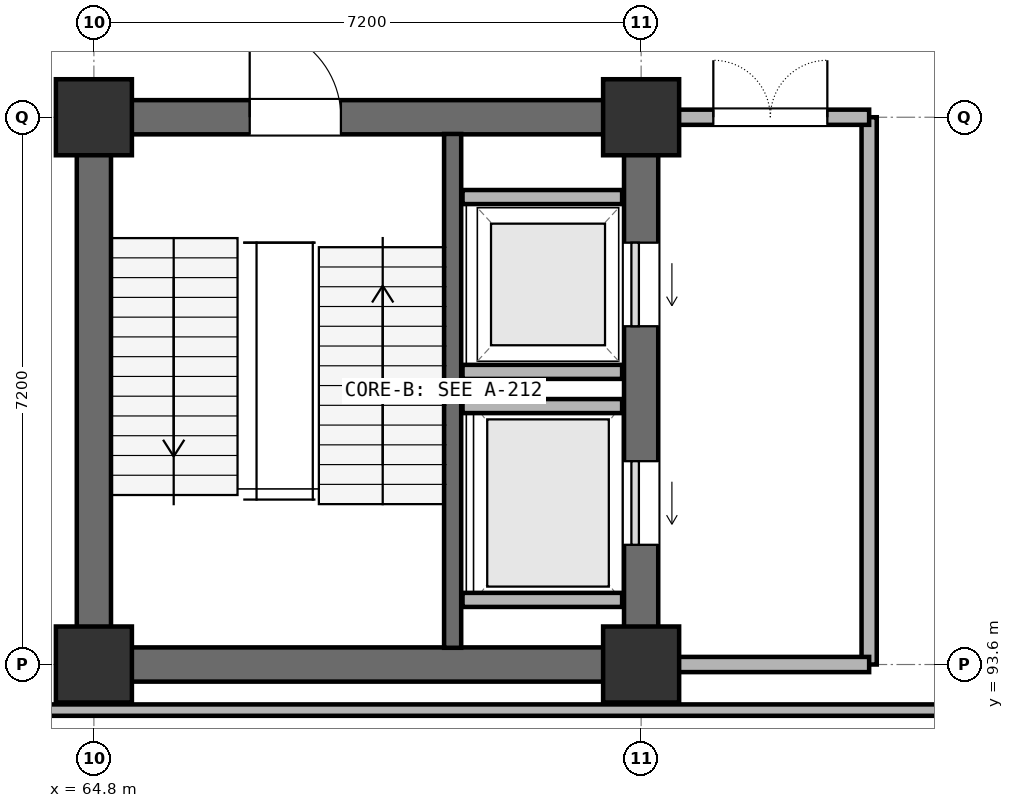
"""IFC4 building model, lengths in metres.
Left out: names, types, materials, properties, quantities, classifications, styles, units other than length and angle.
Written with IfcOpenShell. Run it as: python <this file> out.ifc"""

import sys

from ifc_helpers import new_model, si_unit, direction, frame, frame_2d, origin, origin_2d, place, context, subcontext, project, spatial, rectangle, extrude, element, fill, save


model = new_model("IFC4")
c1 = context("Model", 3, precision=1e-05, world=origin(), true_north=direction((0.0, 1.0)))
c2 = subcontext(c1, "Body", "Model", "MODEL_VIEW")
j1 = project(units=[si_unit("LENGTHUNIT", "METRE"), si_unit("PLANEANGLEUNIT", "RADIAN")], contexts=[c1])
p1 = place(None, origin())
s1 = spatial("IfcSite", under=j1, at=p1, CompositionType="ELEMENT")
p2 = place(p1, origin())
s2 = spatial("IfcBuilding", under=s1, at=p2, CompositionType="ELEMENT")
p3 = place(p2, frame((0.0, 0.0, -4.8)))
s3 = spatial("IfcBuildingStorey", under=s2, at=p3, CompositionType="ELEMENT", Elevation=-4.8)
for number, where, z_axis, x_axis in (
    (1, (64.8, 93.6, 0.0), (0.0, 0.0, 1.0), (1.0, 0.0, 0.0)),
    (2, (64.8, 100.8, 0.0), (0.0, 0.0, 1.0), (1.0, 0.0, 0.0)),
    (3, (72.0, 93.6, 0.0), (0.0, 0.0, 1.0), (1.0, 0.0, 0.0)),
    (4, (72.0, 100.8, 0.0), (0.0, 0.0, 1.0), (1.0, 0.0, 0.0)),
):
    element("IfcColumn", number, at=place(p3, frame(where, z_axis=z_axis, x_axis=x_axis)), inside=s3, PredefinedType="COLUMN", context=c2, shape_type="SweptSolid", body=[
        extrude(rectangle(XDim=1.0, YDim=1.0, at=origin_2d()), origin(), (0.0, 0.0, 1.0), 4.8),
    ])
p4 = place(p3, frame((65.15, 93.6, 0.0), z_axis=(0.0, 0.0, 1.0), x_axis=(1.0, 0.0, 0.0)))
e5 = element("IfcWall", 5, at=p4, inside=s3, PredefinedType="SHEAR", context=c2, shape_type="SweptSolid", body=[
    extrude(rectangle(XDim=6.5, YDim=0.45, at=frame_2d((3.25, 0.0))), origin(), (0.0, 0.0, 1.0), 4.8),
])
p5 = place(p3, frame((72.0, 93.95, 0.0), z_axis=(0.0, 0.0, 1.0), x_axis=(0.0, 1.0, 0.0)))
e6 = element("IfcWall", 6, at=p5, inside=s3, PredefinedType="SHEAR", context=c2, shape_type="SweptSolid", body=[
    extrude(rectangle(XDim=6.5, YDim=0.45, at=frame_2d((3.25, 0.0))), origin(), (0.0, 0.0, 1.0), 4.8),
])
p6 = place(p5, frame((1.225, 0.0, 0.0)))
e7 = element("IfcOpeningElement", 7, at=p6, cuts=e6, PredefinedType="OPENING", context=c2, shape_type="SweptSolid", body=[
    extrude(rectangle(XDim=1.1, YDim=2.2, at=frame_2d((0.55, 1.1))), frame((0.0, 0.235, 0.0), z_axis=(0.0, -1.0, 0.0), x_axis=(1.0, 0.0, 0.0)), (0.0, 0.0, 1.0), 0.47),
])
p7 = place(p5, frame((4.1, 0.0, 0.0)))
e8 = element("IfcOpeningElement", 8, at=p7, cuts=e6, PredefinedType="OPENING", context=c2, shape_type="SweptSolid", body=[
    extrude(rectangle(XDim=1.1, YDim=2.2, at=frame_2d((0.55, 1.1))), frame((0.0, 0.235, 0.0), z_axis=(0.0, -1.0, 0.0), x_axis=(1.0, 0.0, 0.0)), (0.0, 0.0, 1.0), 0.47),
])
p8 = place(p3, frame((71.65, 100.8, 0.0), z_axis=(0.0, 0.0, 1.0), x_axis=(-1.0, 0.0, 0.0)))
e9 = element("IfcWall", 9, at=p8, inside=s3, PredefinedType="SHEAR", context=c2, shape_type="SweptSolid", body=[
    extrude(rectangle(XDim=6.5, YDim=0.45, at=frame_2d((3.25, 0.0))), origin(), (0.0, 0.0, 1.0), 4.8),
])
p9 = place(p8, frame((3.6, 0.0, 0.0)))
e10 = element("IfcOpeningElement", 10, at=p9, cuts=e9, PredefinedType="OPENING", context=c2, shape_type="SweptSolid", body=[
    extrude(rectangle(XDim=1.2, YDim=2.2, at=frame_2d((0.6, 1.1))), frame((0.0, 0.235, 0.0), z_axis=(0.0, -1.0, 0.0), x_axis=(1.0, 0.0, 0.0)), (0.0, 0.0, 1.0), 0.47),
])
p10 = place(p3, frame((64.8, 100.45, 0.0), z_axis=(0.0, 0.0, 1.0), x_axis=(0.0, -1.0, 0.0)))
e11 = element("IfcWall", 11, at=p10, inside=s3, PredefinedType="SHEAR", context=c2, shape_type="SweptSolid", body=[
    extrude(rectangle(XDim=6.5, YDim=0.45, at=frame_2d((3.25, 0.0))), origin(), (0.0, 0.0, 1.0), 4.8),
])
p11 = place(p3, frame((69.52, 93.82, 0.0), z_axis=(0.0, 0.0, 1.0), x_axis=(0.0, 1.0, 0.0)))
e12 = element("IfcWall", 12, at=p11, inside=s3, PredefinedType="SHEAR", context=c2, shape_type="SweptSolid", body=[
    extrude(rectangle(XDim=6.76, YDim=0.225, at=frame_2d((3.38, 0.0))), origin(), (0.0, 0.0, 1.0), 4.8),
])
for number, where, z_axis, x_axis in (
    (13, (69.65, 94.45, 0.0), (0.0, 0.0, 1.0), (1.0, 0.0, 0.0)),
    (14, (69.65, 97.0, 0.0), (0.0, 0.0, 1.0), (1.0, 0.0, 0.0)),
    (15, (69.65, 97.45, 0.0), (0.0, 0.0, 1.0), (1.0, 0.0, 0.0)),
    (16, (69.65, 99.75, 0.0), (0.0, 0.0, 1.0), (1.0, 0.0, 0.0)),
):
    element("IfcWall", number, at=place(p3, frame(where, z_axis=z_axis, x_axis=x_axis)), inside=s3, PredefinedType="PARTITIONING", context=c2, shape_type="SweptSolid", body=[
        extrude(rectangle(XDim=2.1, YDim=0.185, at=frame_2d((1.05, 0.0))), origin(), (0.0, 0.0, 1.0), 4.8),
    ])
p12 = place(p3, frame((75.0, 93.6, 0.0), z_axis=(0.0, 0.0, 1.0), x_axis=(0.0, 1.0, 0.0)))
e17 = element("IfcWall", 17, at=p12, inside=s3, PredefinedType="PARTITIONING", context=c2, shape_type="SweptSolid", body=[
    extrude(rectangle(XDim=7.2, YDim=0.2, at=frame_2d((3.6, 0.0))), origin(), (0.0, 0.0, 1.0), 3.52),
])
p13 = place(p3, frame((72.48, 93.6, 0.0), z_axis=(0.0, 0.0, 1.0), x_axis=(1.0, 0.0, 0.0)))
e18 = element("IfcWall", 18, at=p13, inside=s3, PredefinedType="PARTITIONING", context=c2, shape_type="SweptSolid", body=[
    extrude(rectangle(XDim=2.52, YDim=0.2, at=frame_2d((1.26, 0.0))), origin(), (0.0, 0.0, 1.0), 3.52),
])
p14 = place(p3, frame((75.0, 100.8, 0.0), z_axis=(0.0, 0.0, 1.0), x_axis=(-1.0, 0.0, 0.0)))
e19 = element("IfcWall", 19, at=p14, inside=s3, PredefinedType="PARTITIONING", context=c2, shape_type="SweptSolid", body=[
    extrude(rectangle(XDim=2.52, YDim=0.2, at=frame_2d((1.26, 0.0))), origin(), (0.0, 0.0, 1.0), 3.52),
])
p15 = place(p14, frame((0.55, 0.0, 0.0)))
e20 = element("IfcOpeningElement", 20, at=p15, cuts=e19, PredefinedType="OPENING", context=c2, shape_type="SweptSolid", body=[
    extrude(rectangle(XDim=1.5, YDim=2.2, at=frame_2d((0.75, 1.1))), frame((0.0, 0.11, 0.0), z_axis=(0.0, -1.0, 0.0), x_axis=(1.0, 0.0, 0.0)), (0.0, 0.0, 1.0), 0.22),
])
p16 = place(p3, frame((37.2, 93.0, 0.0), z_axis=(0.0, 0.0, 1.0), x_axis=(1.0, 0.0, 0.0)))
e21 = element("IfcWall", 21, at=p16, inside=s3, PredefinedType="PARTITIONING", context=c2, shape_type="SweptSolid", body=[
    extrude(rectangle(XDim=48.6, YDim=0.15, at=frame_2d((24.3, 0.0))), origin(), (0.0, 0.0, 1.0), 3.52),
])
p17 = place(p16, frame((16.4, 0.0, 0.0)))
e22 = element("IfcOpeningElement", 22, at=p17, cuts=e21, PredefinedType="OPENING", context=c2, shape_type="SweptSolid", body=[
    extrude(rectangle(XDim=1.6, YDim=2.2, at=frame_2d((0.8, 1.1))), frame((0.0, 0.085, 0.0), z_axis=(0.0, -1.0, 0.0), x_axis=(1.0, 0.0, 0.0)), (0.0, 0.0, 1.0), 0.17),
])
p18 = place(p6, origin())
e23 = element("IfcDoor", 23, at=p18, inside=s3, OperationType="SLIDING_TO_LEFT", PredefinedType="DOOR", context=c2, shape_type="SweptSolid", body=[
    extrude(rectangle(XDim=1.1, YDim=2.2, at=frame_2d((0.55, 1.1))), frame((0.0, 0.025, 0.0), z_axis=(0.0, -1.0, 0.0), x_axis=(1.0, 0.0, 0.0)), (0.0, 0.0, 1.0), 0.05),
])
fill(e7, e23)
p19 = place(p7, origin())
e24 = element("IfcDoor", 24, at=p19, inside=s3, OperationType="SLIDING_TO_LEFT", PredefinedType="DOOR", context=c2, shape_type="SweptSolid", body=[
    extrude(rectangle(XDim=1.1, YDim=2.2, at=frame_2d((0.55, 1.1))), frame((0.0, 0.025, 0.0), z_axis=(0.0, -1.0, 0.0), x_axis=(1.0, 0.0, 0.0)), (0.0, 0.0, 1.0), 0.05),
])
fill(e8, e24)
p20 = place(p9, frame((1.2, 0.0, 0.0), z_axis=(0.0, 0.0, 1.0), x_axis=(-1.0, 0.0, 0.0)))
e25 = element("IfcDoor", 25, at=p20, inside=s3, OperationType="SINGLE_SWING_LEFT", PredefinedType="DOOR", context=c2, shape_type="SweptSolid", body=[
    extrude(rectangle(XDim=1.2, YDim=2.2, at=frame_2d((0.6, 1.1))), frame((0.0, 0.025, 0.0), z_axis=(0.0, -1.0, 0.0), x_axis=(1.0, 0.0, 0.0)), (0.0, 0.0, 1.0), 0.05),
])
fill(e10, e25)
p21 = place(p15, frame((1.5, 0.0, 0.0), z_axis=(0.0, 0.0, 1.0), x_axis=(-1.0, 0.0, 0.0)))
e26 = element("IfcDoor", 26, at=p21, inside=s3, OperationType="DOUBLE_DOOR_SINGLE_SWING", PredefinedType="DOOR", context=c2, shape_type="SweptSolid", body=[
    extrude(rectangle(XDim=1.5, YDim=2.2, at=frame_2d((0.75, 1.1))), frame((0.0, 0.025, 0.0), z_axis=(0.0, -1.0, 0.0), x_axis=(1.0, 0.0, 0.0)), (0.0, 0.0, 1.0), 0.05),
])
fill(e20, e26)
save(model, sys.argv[1])
